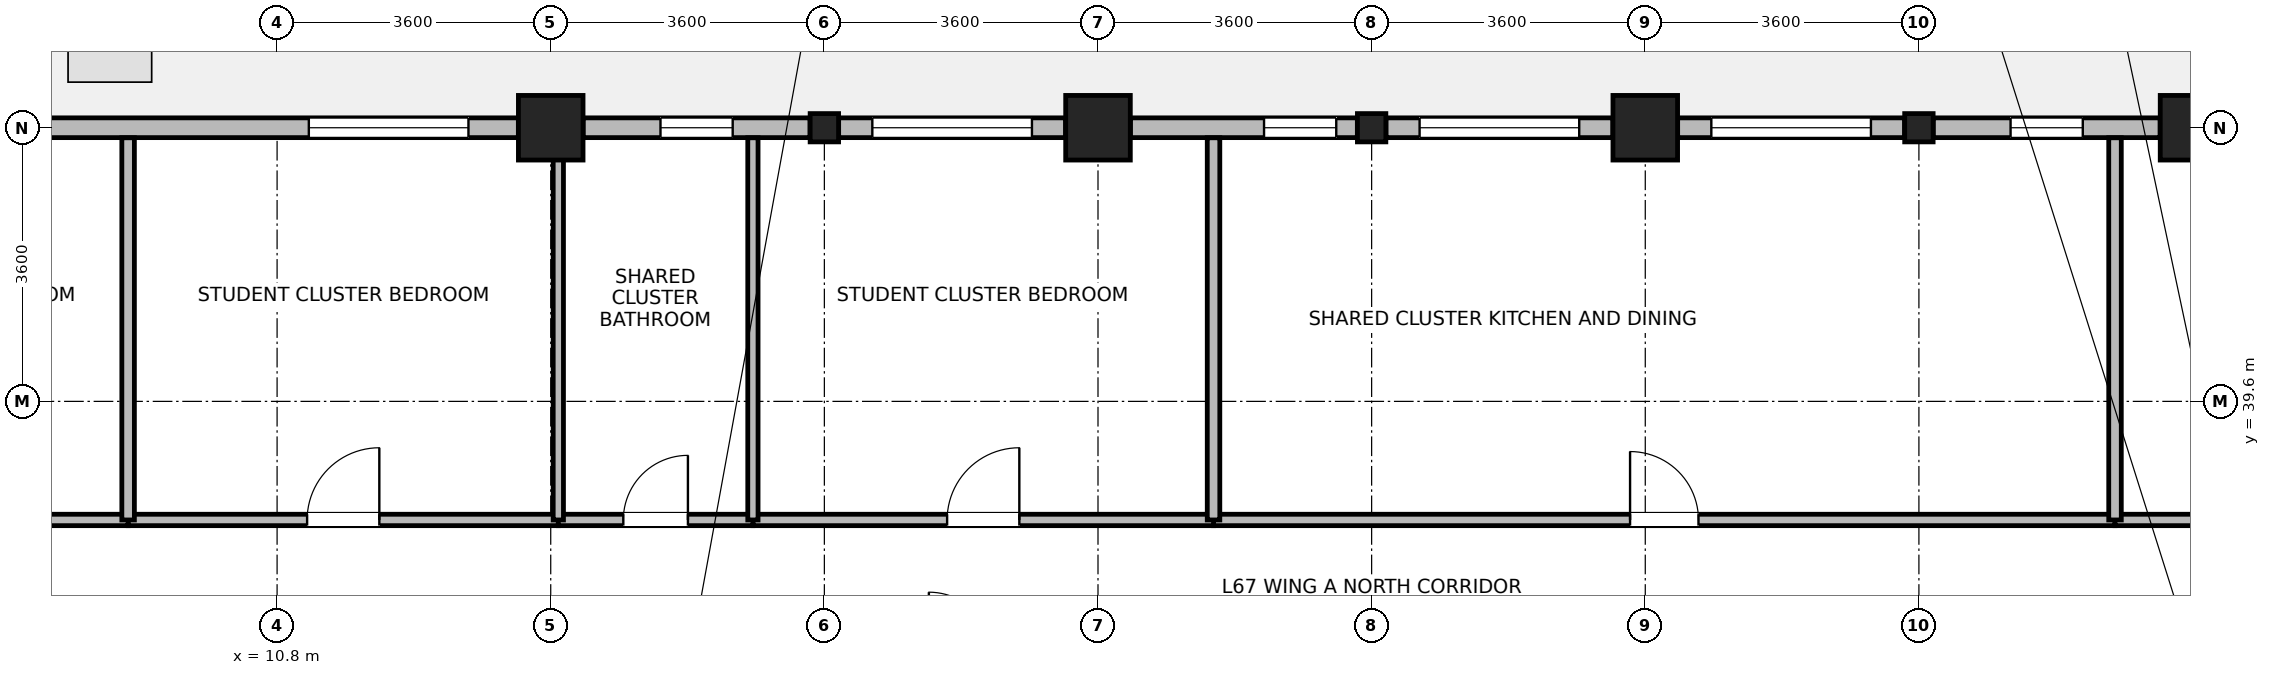
"""IFC4 building model, lengths in metres.
Left out: names, types, materials, properties, quantities, classifications, styles, units other than length and angle.
Written with IfcOpenShell. Run it as: python <this file> out.ifc"""

import sys

from ifc_helpers import new_model, si_unit, direction, frame, frame_2d, origin, origin_2d, place, context, subcontext, project, spatial, rectangle, i_section, extrude, source, transform, mapped, element, fill, save


model = new_model("IFC4")
c1 = context("Model", 3, precision=1e-05, world=origin(), true_north=direction((0.0, 1.0)))
c2 = subcontext(c1, "Body", "Model", "MODEL_VIEW")
j1 = project(units=[si_unit("LENGTHUNIT", "METRE"), si_unit("PLANEANGLEUNIT", "RADIAN")], contexts=[c1])
p1 = place(None, origin())
s1 = spatial("IfcSite", under=j1, at=p1, CompositionType="ELEMENT")
p2 = place(p1, origin())
s2 = spatial("IfcBuilding", under=s1, at=p2, CompositionType="ELEMENT")
p3 = place(p2, frame((0.0, 0.0, 261.0)))
s3 = spatial("IfcBuildingStorey", under=s2, at=p3, CompositionType="ELEMENT", Elevation=261.0)
m1 = source(origin(), c2, "Body", "SweptSolid", [
    extrude(rectangle(XDim=0.85, YDim=0.85, at=origin_2d()), origin(), (0.0, 0.0, 1.0), 3.7),
])
for number, where, z_axis, x_axis in (
    (1, (14.4, 43.2, 0.0), (0.0, 0.0, 1.0), (1.0, 0.0, 0.0)),
    (2, (21.6, 43.2, 0.0), (0.0, 0.0, 1.0), (1.0, 0.0, 0.0)),
    (3, (28.8, 43.2, 0.0), (0.0, 0.0, 1.0), (1.0, 0.0, 0.0)),
    (4, (36.0, 43.2, 0.0), (0.0, 0.0, 1.0), (1.0, 0.0, 0.0)),
):
    element("IfcColumn", number, at=place(p3, frame(where, z_axis=z_axis, x_axis=x_axis)), inside=s3, PredefinedType="COLUMN", context=c2, shape_type="MappedRepresentation", body=[
        mapped(m1, transform((0.0, 0.0, 0.0), x_axis=(1.0, 0.0, 0.0), y_axis=(0.0, 1.0, 0.0), z_axis=(0.0, 0.0, 1.0), scale=1.0)),
    ])
m2 = source(origin(), c2, "Body", "SweptSolid", [
    extrude(i_section(OverallWidth=0.374, OverallDepth=0.372, WebThickness=0.015, FlangeThickness=0.026, FilletRadius=0.015, at=origin_2d()), origin(), (0.0, 0.0, 1.0), 3.7),
])
for number, where, z_axis, x_axis in (
    (5, (18.0, 43.2, 0.0), (0.0, 0.0, 1.0), (1.0, 0.0, 0.0)),
    (6, (25.2, 43.2, 0.0), (0.0, 0.0, 1.0), (1.0, 0.0, 0.0)),
    (7, (32.4, 43.2, 0.0), (0.0, 0.0, 1.0), (1.0, 0.0, 0.0)),
):
    element("IfcColumn", number, at=place(p3, frame(where, z_axis=z_axis, x_axis=x_axis)), inside=s3, PredefinedType="COLUMN", context=c2, shape_type="MappedRepresentation", body=[
        mapped(m2, transform((0.0, 0.0, 0.0), x_axis=(1.0, 0.0, 0.0), y_axis=(0.0, 1.0, 0.0), z_axis=(0.0, 0.0, 1.0), scale=1.0)),
    ])
p4 = place(p3, frame((32.588, 43.2, 0.0), z_axis=(0.0, 0.0, 1.0), x_axis=(1.0, 0.0, 0.0)))
e8 = element("IfcWall", 8, at=p4, inside=s3, PredefinedType="STANDARD", context=c2, shape_type="SweptSolid", body=[
    extrude(rectangle(XDim=2.986, YDim=0.26, at=frame_2d((1.493, 0.0))), origin(), (0.0, 0.0, 1.0), 3.055),
])
p5 = place(p4, frame((1.018, 0.0, 0.85)))
e9 = element("IfcOpeningElement", 9, at=p5, cuts=e8, PredefinedType="OPENING", context=c2, shape_type="SweptSolid", body=[
    extrude(rectangle(XDim=0.95, YDim=1.75, at=frame_2d((0.475, 0.875))), frame((0.0, 0.14, 0.0), z_axis=(0.0, -1.0, 0.0), x_axis=(1.0, 0.0, 0.0)), (0.0, 0.0, 1.0), 0.28),
])
p6 = place(p3, frame((29.226, 43.2, 0.0), z_axis=(0.0, 0.0, 1.0), x_axis=(1.0, 0.0, 0.0)))
e10 = element("IfcWall", 10, at=p6, inside=s3, PredefinedType="STANDARD", context=c2, shape_type="SweptSolid", body=[
    extrude(rectangle(XDim=2.986, YDim=0.26, at=frame_2d((1.493, 0.0))), origin(), (0.0, 0.0, 1.0), 3.055),
])
p7 = place(p6, frame((0.443, 0.0, 0.85)))
e11 = element("IfcOpeningElement", 11, at=p7, cuts=e10, PredefinedType="OPENING", context=c2, shape_type="SweptSolid", body=[
    extrude(rectangle(XDim=2.1, YDim=1.95, at=frame_2d((1.05, 0.975))), frame((0.0, 0.14, 0.0), z_axis=(0.0, -1.0, 0.0), x_axis=(1.0, 0.0, 0.0)), (0.0, 0.0, 1.0), 0.28),
])
p8 = place(p3, frame((25.388, 43.2, 0.0), z_axis=(0.0, 0.0, 1.0), x_axis=(1.0, 0.0, 0.0)))
e12 = element("IfcWall", 12, at=p8, inside=s3, PredefinedType="STANDARD", context=c2, shape_type="SweptSolid", body=[
    extrude(rectangle(XDim=2.986, YDim=0.26, at=frame_2d((1.493, 0.0))), origin(), (0.0, 0.0, 1.0), 3.055),
])
p9 = place(p8, frame((0.443, 0.0, 0.85)))
e13 = element("IfcOpeningElement", 13, at=p9, cuts=e12, PredefinedType="OPENING", context=c2, shape_type="SweptSolid", body=[
    extrude(rectangle(XDim=2.1, YDim=1.95, at=frame_2d((1.05, 0.975))), frame((0.0, 0.14, 0.0), z_axis=(0.0, -1.0, 0.0), x_axis=(1.0, 0.0, 0.0)), (0.0, 0.0, 1.0), 0.28),
])
p10 = place(p3, frame((22.026, 43.2, 0.0), z_axis=(0.0, 0.0, 1.0), x_axis=(1.0, 0.0, 0.0)))
e14 = element("IfcWall", 14, at=p10, inside=s3, PredefinedType="STANDARD", context=c2, shape_type="SweptSolid", body=[
    extrude(rectangle(XDim=2.986, YDim=0.26, at=frame_2d((1.493, 0.0))), origin(), (0.0, 0.0, 1.0), 3.055),
])
p11 = place(p10, frame((1.759, 0.0, 0.85)))
e15 = element("IfcOpeningElement", 15, at=p11, cuts=e14, PredefinedType="OPENING", context=c2, shape_type="SweptSolid", body=[
    extrude(rectangle(XDim=0.95, YDim=1.75, at=frame_2d((0.475, 0.875))), frame((0.0, 0.14, 0.0), z_axis=(0.0, -1.0, 0.0), x_axis=(1.0, 0.0, 0.0)), (0.0, 0.0, 1.0), 0.28),
])
p12 = place(p3, frame((18.188, 43.2, 0.0), z_axis=(0.0, 0.0, 1.0), x_axis=(1.0, 0.0, 0.0)))
e16 = element("IfcWall", 16, at=p12, inside=s3, PredefinedType="STANDARD", context=c2, shape_type="SweptSolid", body=[
    extrude(rectangle(XDim=2.986, YDim=0.26, at=frame_2d((1.493, 0.0))), origin(), (0.0, 0.0, 1.0), 3.055),
])
p13 = place(p12, frame((0.443, 0.0, 0.85)))
e17 = element("IfcOpeningElement", 17, at=p13, cuts=e16, PredefinedType="OPENING", context=c2, shape_type="SweptSolid", body=[
    extrude(rectangle(XDim=2.1, YDim=1.95, at=frame_2d((1.05, 0.975))), frame((0.0, 0.14, 0.0), z_axis=(0.0, -1.0, 0.0), x_axis=(1.0, 0.0, 0.0)), (0.0, 0.0, 1.0), 0.28),
])
p14 = place(p3, frame((14.826, 43.2, 0.0), z_axis=(0.0, 0.0, 1.0), x_axis=(1.0, 0.0, 0.0)))
e18 = element("IfcWall", 18, at=p14, inside=s3, PredefinedType="STANDARD", context=c2, shape_type="SweptSolid", body=[
    extrude(rectangle(XDim=2.986, YDim=0.26, at=frame_2d((1.493, 0.0))), origin(), (0.0, 0.0, 1.0), 3.055),
])
p15 = place(p14, frame((1.018, 0.0, 0.85)))
e19 = element("IfcOpeningElement", 19, at=p15, cuts=e18, PredefinedType="OPENING", context=c2, shape_type="SweptSolid", body=[
    extrude(rectangle(XDim=0.95, YDim=1.75, at=frame_2d((0.475, 0.875))), frame((0.0, 0.14, 0.0), z_axis=(0.0, -1.0, 0.0), x_axis=(1.0, 0.0, 0.0)), (0.0, 0.0, 1.0), 0.28),
])
p16 = place(p3, frame((3.735, 43.2, 0.0), z_axis=(0.0, 0.0, 1.0), x_axis=(1.0, 0.0, 0.0)))
e20 = element("IfcWall", 20, at=p16, inside=s3, PredefinedType="STANDARD", context=c2, shape_type="SweptSolid", body=[
    extrude(rectangle(XDim=10.239, YDim=0.26, at=frame_2d((5.12, 0.0))), origin(), (0.0, 0.0, 1.0), 3.455),
])
p17 = place(p16, frame((0.656, 0.0, 0.85)))
e21 = element("IfcOpeningElement", 21, at=p17, cuts=e20, PredefinedType="OPENING", context=c2, shape_type="SweptSolid", body=[
    extrude(rectangle(XDim=2.1, YDim=1.95, at=frame_2d((1.05, 0.975))), frame((0.0, 0.14, 0.0), z_axis=(0.0, -1.0, 0.0), x_axis=(1.0, 0.0, 0.0)), (0.0, 0.0, 1.0), 0.28),
])
p18 = place(p16, frame((7.482, 0.0, 0.85)))
e22 = element("IfcOpeningElement", 22, at=p18, cuts=e20, PredefinedType="OPENING", context=c2, shape_type="SweptSolid", body=[
    extrude(rectangle(XDim=2.1, YDim=1.95, at=frame_2d((1.05, 0.975))), frame((0.0, 0.14, 0.0), z_axis=(0.0, -1.0, 0.0), x_axis=(1.0, 0.0, 0.0)), (0.0, 0.0, 1.0), 0.28),
])
p19 = place(p3, frame((23.12, 38.04, 0.0), z_axis=(0.0, 0.0, 1.0), x_axis=(1.0, 0.0, 0.0)))
e23 = element("IfcWall", 23, at=p19, inside=s3, PredefinedType="PARTITIONING", context=c2, shape_type="SweptSolid", body=[
    extrude(rectangle(XDim=11.86, YDim=0.15, at=frame_2d((5.93, 0.0))), origin(), (0.0, 0.0, 1.0), 3.455),
])
p20 = place(p19, frame((5.48, 0.0, 0.0)))
e24 = element("IfcOpeningElement", 24, at=p20, cuts=e23, PredefinedType="OPENING", context=c2, shape_type="SweptSolid", body=[
    extrude(rectangle(XDim=0.9, YDim=2.08, at=frame_2d((0.45, 1.04))), frame((0.0, 0.085, 0.0), z_axis=(0.0, -1.0, 0.0), x_axis=(1.0, 0.0, 0.0)), (0.0, 0.0, 1.0), 0.17),
])
p21 = place(p3, frame((34.98, 38.04, 0.0), z_axis=(0.0, 0.0, 1.0), x_axis=(1.0, 0.0, 0.0)))
e25 = element("IfcWall", 25, at=p21, inside=s3, PredefinedType="PARTITIONING", context=c2, shape_type="SweptSolid", body=[
    extrude(rectangle(XDim=9.96, YDim=0.15, at=frame_2d((4.98, 0.0))), origin(), (0.0, 0.0, 1.0), 3.455),
])
p22 = place(p21, frame((4.505, 0.0, 0.0)))
e26 = element("IfcOpeningElement", 26, at=p22, cuts=e25, PredefinedType="OPENING", context=c2, shape_type="SweptSolid", body=[
    extrude(rectangle(XDim=0.95, YDim=2.1, at=frame_2d((0.475, 1.05))), frame((0.0, 0.085, 0.0), z_axis=(0.0, -1.0, 0.0), x_axis=(1.0, 0.0, 0.0)), (0.0, 0.0, 1.0), 0.17),
])
p23 = place(p3, frame((17.06, 38.04, 0.0), z_axis=(0.0, 0.0, 1.0), x_axis=(1.0, 0.0, 0.0)))
e27 = element("IfcWall", 27, at=p23, inside=s3, PredefinedType="PARTITIONING", context=c2, shape_type="SweptSolid", body=[
    extrude(rectangle(XDim=6.06, YDim=0.15, at=frame_2d((3.03, 0.0))), origin(), (0.0, 0.0, 1.0), 3.455),
])
p24 = place(p23, frame((2.555, 0.0, 0.0)))
e28 = element("IfcOpeningElement", 28, at=p24, cuts=e27, PredefinedType="OPENING", context=c2, shape_type="SweptSolid", body=[
    extrude(rectangle(XDim=0.95, YDim=2.1, at=frame_2d((0.475, 1.05))), frame((0.0, 0.085, 0.0), z_axis=(0.0, -1.0, 0.0), x_axis=(1.0, 0.0, 0.0)), (0.0, 0.0, 1.0), 0.17),
])
p25 = place(p3, frame((8.84, 38.04, 0.0), z_axis=(0.0, 0.0, 1.0), x_axis=(1.0, 0.0, 0.0)))
e29 = element("IfcWall", 29, at=p25, inside=s3, PredefinedType="PARTITIONING", context=c2, shape_type="SweptSolid", body=[
    extrude(rectangle(XDim=5.66, YDim=0.15, at=frame_2d((2.83, 0.0))), origin(), (0.0, 0.0, 1.0), 3.455),
])
p26 = place(p25, frame((2.355, 0.0, 0.0)))
e30 = element("IfcOpeningElement", 30, at=p26, cuts=e29, PredefinedType="OPENING", context=c2, shape_type="SweptSolid", body=[
    extrude(rectangle(XDim=0.95, YDim=2.1, at=frame_2d((0.475, 1.05))), frame((0.0, 0.085, 0.0), z_axis=(0.0, -1.0, 0.0), x_axis=(1.0, 0.0, 0.0)), (0.0, 0.0, 1.0), 0.17),
])
p27 = place(p3, frame((3.732, 38.04, 0.0), z_axis=(0.0, 0.0, 1.0), x_axis=(1.0, 0.0, 0.0)))
e31 = element("IfcWall", 31, at=p27, inside=s3, PredefinedType="PARTITIONING", context=c2, shape_type="SweptSolid", body=[
    extrude(rectangle(XDim=5.108, YDim=0.15, at=frame_2d((2.554, 0.0))), origin(), (0.0, 0.0, 1.0), 3.455),
])
p28 = place(p27, frame((2.079, 0.0, 0.0)))
e32 = element("IfcOpeningElement", 32, at=p28, cuts=e31, PredefinedType="OPENING", context=c2, shape_type="SweptSolid", body=[
    extrude(rectangle(XDim=0.95, YDim=2.1, at=frame_2d((0.475, 1.05))), frame((0.0, 0.085, 0.0), z_axis=(0.0, -1.0, 0.0), x_axis=(1.0, 0.0, 0.0)), (0.0, 0.0, 1.0), 0.17),
])
p29 = place(p3, frame((14.5, 38.04, 0.0), z_axis=(0.0, 0.0, 1.0), x_axis=(1.0, 0.0, 0.0)))
e33 = element("IfcWall", 33, at=p29, inside=s3, PredefinedType="PARTITIONING", context=c2, shape_type="SweptSolid", body=[
    extrude(rectangle(XDim=2.56, YDim=0.15, at=frame_2d((1.28, 0.0))), origin(), (0.0, 0.0, 1.0), 3.455),
])
p30 = place(p29, frame((0.855, 0.0, 0.0)))
e34 = element("IfcOpeningElement", 34, at=p30, cuts=e33, PredefinedType="OPENING", context=c2, shape_type="SweptSolid", body=[
    extrude(rectangle(XDim=0.85, YDim=2.04, at=frame_2d((0.425, 1.02))), frame((0.0, 0.085, 0.0), z_axis=(0.0, -1.0, 0.0), x_axis=(1.0, 0.0, 0.0)), (0.0, 0.0, 1.0), 0.17),
])
p31 = place(p3, frame((8.84, 38.04, 0.0), z_axis=(0.0, 0.0, 1.0), x_axis=(0.0, 1.0, 0.0)))
e35 = element("IfcWall", 35, at=p31, inside=s3, PredefinedType="PARTITIONING", context=c2, shape_type="SweptSolid", body=[
    extrude(rectangle(XDim=5.028, YDim=0.165, at=frame_2d((2.514, 0.0))), origin(), (0.0, 0.0, 1.0), 3.455),
])
p32 = place(p3, frame((14.5, 38.04, 0.0), z_axis=(0.0, 0.0, 1.0), x_axis=(0.0, 1.0, 0.0)))
e36 = element("IfcWall", 36, at=p32, inside=s3, PredefinedType="PARTITIONING", context=c2, shape_type="SweptSolid", body=[
    extrude(rectangle(XDim=5.028, YDim=0.135, at=frame_2d((2.514, 0.0))), origin(), (0.0, 0.0, 1.0), 3.055),
])
p33 = place(p3, frame((17.06, 38.04, 0.0), z_axis=(0.0, 0.0, 1.0), x_axis=(0.0, 1.0, 0.0)))
e37 = element("IfcWall", 37, at=p33, inside=s3, PredefinedType="PARTITIONING", context=c2, shape_type="SweptSolid", body=[
    extrude(rectangle(XDim=5.028, YDim=0.135, at=frame_2d((2.514, 0.0))), origin(), (0.0, 0.0, 1.0), 3.455),
])
for number, where, z_axis, x_axis in (
    (38, (23.12, 38.04, 0.0), (0.0, 0.0, 1.0), (0.0, 1.0, 0.0)),
    (39, (34.98, 38.04, 0.0), (0.0, 0.0, 1.0), (0.0, 1.0, 0.0)),
):
    element("IfcWall", number, at=place(p3, frame(where, z_axis=z_axis, x_axis=x_axis)), inside=s3, PredefinedType="PARTITIONING", context=c2, shape_type="SweptSolid", body=[
        extrude(rectangle(XDim=5.028, YDim=0.165, at=frame_2d((2.514, 0.0))), origin(), (0.0, 0.0, 1.0), 3.455),
    ])
p34 = place(p5, origin())
e40 = element("IfcWindow", 40, at=p34, inside=s3, PartitioningType="SINGLE_PANEL", PredefinedType="WINDOW", context=c2, shape_type="SweptSolid", body=[
    extrude(rectangle(XDim=0.95, YDim=1.75, at=frame_2d((0.475, 0.875))), frame((0.0, 0.03, 0.0), z_axis=(0.0, -1.0, 0.0), x_axis=(1.0, 0.0, 0.0)), (0.0, 0.0, 1.0), 0.06),
])
fill(e9, e40)
p35 = place(p7, origin())
e41 = element("IfcWindow", 41, at=p35, inside=s3, PartitioningType="SINGLE_PANEL", PredefinedType="WINDOW", context=c2, shape_type="SweptSolid", body=[
    extrude(rectangle(XDim=2.1, YDim=1.95, at=frame_2d((1.05, 0.975))), frame((0.0, 0.03, 0.0), z_axis=(0.0, -1.0, 0.0), x_axis=(1.0, 0.0, 0.0)), (0.0, 0.0, 1.0), 0.06),
])
fill(e11, e41)
p36 = place(p9, origin())
e42 = element("IfcWindow", 42, at=p36, inside=s3, PartitioningType="SINGLE_PANEL", PredefinedType="WINDOW", context=c2, shape_type="SweptSolid", body=[
    extrude(rectangle(XDim=2.1, YDim=1.95, at=frame_2d((1.05, 0.975))), frame((0.0, 0.03, 0.0), z_axis=(0.0, -1.0, 0.0), x_axis=(1.0, 0.0, 0.0)), (0.0, 0.0, 1.0), 0.06),
])
fill(e13, e42)
p37 = place(p11, origin())
e43 = element("IfcWindow", 43, at=p37, inside=s3, PartitioningType="SINGLE_PANEL", PredefinedType="WINDOW", context=c2, shape_type="SweptSolid", body=[
    extrude(rectangle(XDim=0.95, YDim=1.75, at=frame_2d((0.475, 0.875))), frame((0.0, 0.03, 0.0), z_axis=(0.0, -1.0, 0.0), x_axis=(1.0, 0.0, 0.0)), (0.0, 0.0, 1.0), 0.06),
])
fill(e15, e43)
p38 = place(p13, origin())
e44 = element("IfcWindow", 44, at=p38, inside=s3, PartitioningType="SINGLE_PANEL", PredefinedType="WINDOW", context=c2, shape_type="SweptSolid", body=[
    extrude(rectangle(XDim=2.1, YDim=1.95, at=frame_2d((1.05, 0.975))), frame((0.0, 0.03, 0.0), z_axis=(0.0, -1.0, 0.0), x_axis=(1.0, 0.0, 0.0)), (0.0, 0.0, 1.0), 0.06),
])
fill(e17, e44)
p39 = place(p15, origin())
e45 = element("IfcWindow", 45, at=p39, inside=s3, PartitioningType="SINGLE_PANEL", PredefinedType="WINDOW", context=c2, shape_type="SweptSolid", body=[
    extrude(rectangle(XDim=0.95, YDim=1.75, at=frame_2d((0.475, 0.875))), frame((0.0, 0.03, 0.0), z_axis=(0.0, -1.0, 0.0), x_axis=(1.0, 0.0, 0.0)), (0.0, 0.0, 1.0), 0.06),
])
fill(e19, e45)
p40 = place(p18, origin())
e46 = element("IfcWindow", 46, at=p40, inside=s3, PartitioningType="SINGLE_PANEL", PredefinedType="WINDOW", context=c2, shape_type="SweptSolid", body=[
    extrude(rectangle(XDim=2.1, YDim=1.95, at=frame_2d((1.05, 0.975))), frame((0.0, 0.03, 0.0), z_axis=(0.0, -1.0, 0.0), x_axis=(1.0, 0.0, 0.0)), (0.0, 0.0, 1.0), 0.06),
])
fill(e22, e46)
p41 = place(p20, origin())
e47 = element("IfcDoor", 47, at=p41, inside=s3, OperationType="SINGLE_SWING_LEFT", PredefinedType="DOOR", context=c2, shape_type="SweptSolid", body=[
    extrude(rectangle(XDim=0.9, YDim=2.08, at=frame_2d((0.45, 1.04))), frame((0.0, 0.025, 0.0), z_axis=(0.0, -1.0, 0.0), x_axis=(1.0, 0.0, 0.0)), (0.0, 0.0, 1.0), 0.05),
])
fill(e24, e47)
p42 = place(p24, origin())
e48 = element("IfcDoor", 48, at=p42, inside=s3, OperationType="SINGLE_SWING_RIGHT", PredefinedType="DOOR", context=c2, shape_type="SweptSolid", body=[
    extrude(rectangle(XDim=0.95, YDim=2.1, at=frame_2d((0.475, 1.05))), frame((0.0, 0.025, 0.0), z_axis=(0.0, -1.0, 0.0), x_axis=(1.0, 0.0, 0.0)), (0.0, 0.0, 1.0), 0.05),
])
fill(e28, e48)
p43 = place(p26, origin())
e49 = element("IfcDoor", 49, at=p43, inside=s3, OperationType="SINGLE_SWING_RIGHT", PredefinedType="DOOR", context=c2, shape_type="SweptSolid", body=[
    extrude(rectangle(XDim=0.95, YDim=2.1, at=frame_2d((0.475, 1.05))), frame((0.0, 0.025, 0.0), z_axis=(0.0, -1.0, 0.0), x_axis=(1.0, 0.0, 0.0)), (0.0, 0.0, 1.0), 0.05),
])
fill(e30, e49)
p44 = place(p30, origin())
e50 = element("IfcDoor", 50, at=p44, inside=s3, OperationType="SINGLE_SWING_RIGHT", PredefinedType="DOOR", context=c2, shape_type="SweptSolid", body=[
    extrude(rectangle(XDim=0.85, YDim=2.04, at=frame_2d((0.425, 1.02))), frame((0.0, 0.025, 0.0), z_axis=(0.0, -1.0, 0.0), x_axis=(1.0, 0.0, 0.0)), (0.0, 0.0, 1.0), 0.05),
])
fill(e34, e50)
save(model, sys.argv[1])
